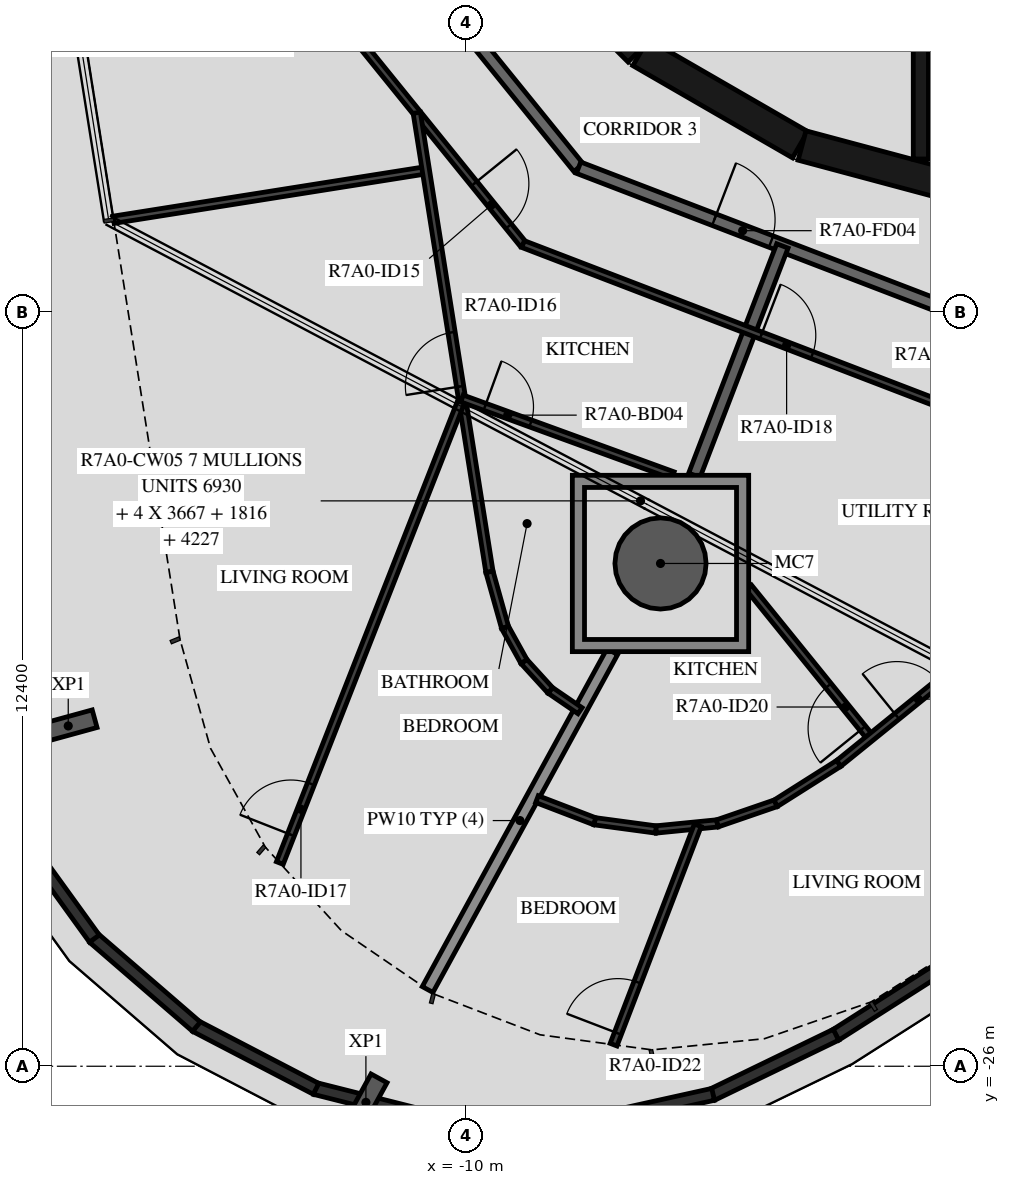
"""IFC4 building model, lengths in metres.
Left out: names, types, materials, properties, quantities, classifications, styles, units other than length and angle.
Written with IfcOpenShell. Run it as: python <this file> out.ifc"""

import sys

from ifc_helpers import new_model, si_unit, direction, frame, frame_2d, origin, origin_2d, place, context, subcontext, project, spatial, polyline, rectangle, hollow_circle, i_section, outline, extrude, element, fill, save


model = new_model("IFC4")
c1 = context("Model", 3, precision=1e-05, world=origin(), true_north=direction((0.0, 1.0)))
c2 = subcontext(c1, "Body", "Model", "MODEL_VIEW")
j1 = project(units=[si_unit("LENGTHUNIT", "METRE"), si_unit("PLANEANGLEUNIT", "RADIAN")], contexts=[c1])
p1 = place(None, origin())
s1 = spatial("IfcSite", under=j1, at=p1, CompositionType="ELEMENT")
p2 = place(p1, origin())
s2 = spatial("IfcBuilding", under=s1, at=p2, CompositionType="ELEMENT")
p3 = place(p2, frame((0.0, 0.0, 263.4)))
s3 = spatial("IfcBuildingStorey", under=s2, at=p3, CompositionType="ELEMENT", Elevation=263.4)
p4 = place(p3, frame((-6.807, -17.732, -0.45), z_axis=(0.0, 0.0, 1.0), x_axis=(1.0, 0.0, 0.0)))
e1 = element("IfcColumn", 1, at=p4, inside=s3, PredefinedType="COLUMN", context=c2, shape_type="SweptSolid", body=[
    extrude(hollow_circle(Radius=0.75, WallThickness=0.035, at=origin_2d()), origin(), (0.0, 0.0, 1.0), 3.57),
])
for number, where, z_axis, x_axis in (
    (2, (-16.547, -20.404, -0.45), (0.0, 0.0, 1.0), (-0.265, 0.964, 0.0)),
    (3, (-11.652, -26.594, -0.45), (0.0, 0.0, 1.0), (-0.877, 0.48, 0.0)),
):
    element("IfcColumn", number, at=place(p3, frame(where, z_axis=z_axis, x_axis=x_axis)), inside=s3, PredefinedType="COLUMN", context=c2, shape_type="SweptSolid", body=[
        extrude(i_section(OverallWidth=0.3, OverallDepth=0.9, WebThickness=0.019, FlangeThickness=0.035, FilletRadius=0.03, at=origin_2d()), origin(), (0.0, 0.0, 1.0), 3.57),
    ])
p5 = place(p3, frame((24.757, -7.212, 0.03), z_axis=(0.0, 0.0, 1.0), x_axis=(-0.843392095095, -0.537298589177, 0.0)))
e4 = element("IfcWall", 4, at=p5, inside=s3, PredefinedType="PARAPET", context=c2, shape_type="SweptSolid", body=[
    extrude(rectangle(XDim=34.009, YDim=0.2, at=frame_2d((17.004, 0.0))), origin(), (0.0, 0.0, 1.0), 1.5),
])
p6 = place(p3, frame((-3.921, -25.482, 0.03), z_axis=(0.0, 0.0, 1.0), x_axis=(-0.900085379351, -0.435713564028, 0.0)))
e5 = element("IfcWall", 5, at=p6, inside=s3, PredefinedType="PARAPET", context=c2, shape_type="SweptSolid", body=[
    extrude(rectangle(XDim=2.258, YDim=0.2, at=frame_2d((1.129, 0.0))), origin(), (0.0, 0.0, 1.0), 1.5),
])
p7 = place(p3, frame((-5.942, -26.462, 0.03), z_axis=(0.0, 0.0, 1.0), x_axis=(-0.976302939935, -0.21640833966, 0.0)))
e6 = element("IfcWall", 6, at=p7, inside=s3, PredefinedType="PARAPET", context=c2, shape_type="SweptSolid", body=[
    extrude(rectangle(XDim=2.228, YDim=0.2, at=frame_2d((1.114, 0.0))), origin(), (0.0, 0.0, 1.0), 1.5),
])
for number, where, z_axis, x_axis in (
    (7, (-10.323, -26.912, 0.03), (0.0, 0.0, 1.0), (-0.97, 0.245, 0.0)),
    (8, (-12.472, -26.371, 0.03), (0.0, 0.0, 1.0), (-0.887, 0.462, 0.0)),
    (9, (-14.439, -25.349, 0.03), (0.0, 0.0, 1.0), (-0.757, 0.654, 0.0)),
    (10, (-16.117, -23.9, 0.03), (0.0, 0.0, 1.0), (-0.586, 0.811, 0.0)),
):
    element("IfcWall", number, at=place(p3, frame(where, z_axis=z_axis, x_axis=x_axis)), inside=s3, PredefinedType="PARAPET", context=c2, shape_type="SweptSolid", body=[
        extrude(rectangle(XDim=2.228, YDim=0.2, at=frame_2d((1.114, 0.0))), origin(), (0.0, 0.0, 1.0), 1.5),
    ])
p8 = place(p3, frame((-9.308, -7.164, 0.0), z_axis=(0.0, 0.0, 1.0), x_axis=(0.707106781187, -0.707106781187, 0.0)))
e11 = element("IfcWall", 11, at=p8, inside=s3, PredefinedType="SHEAR", context=c2, shape_type="SweptSolid", body=[
    extrude(rectangle(XDim=3.032, YDim=0.5, at=frame_2d((1.516, 0.0))), origin(), (0.0, 0.0, 1.0), 3.12),
])
for number, where, z_axis, x_axis in (
    (12, (-7.137, -9.329, 0.0), (0.0, 0.0, 1.0), (0.866, -0.5, 0.0)),
    (13, (-4.479, -10.858, 0.0), (0.0, 0.0, 1.0), (0.966, -0.259, 0.0)),
):
    element("IfcWall", number, at=place(p3, frame(where, z_axis=z_axis, x_axis=x_axis)), inside=s3, PredefinedType="SHEAR", context=c2, shape_type="SweptSolid", body=[
        extrude(rectangle(XDim=3.033, YDim=0.5, at=frame_2d((1.516, 0.0))), origin(), (0.0, 0.0, 1.0), 3.12),
    ])
p9 = place(p3, frame((-2.525, -8.97, 0.0), z_axis=(0.0, 0.0, 1.0), x_axis=(0.0, -1.0, 0.0)))
e14 = element("IfcWall", 14, at=p9, inside=s3, PredefinedType="SHEAR", context=c2, shape_type="SweptSolid", body=[
    extrude(rectangle(XDim=2.11, YDim=0.25, at=frame_2d((1.055, 0.0))), origin(), (0.0, 0.0, 1.0), 3.12),
])
p10 = place(p3, frame((-12.673, -5.643, 0.0), z_axis=(0.0, 0.0, 1.0), x_axis=(0.629302871585, -0.777160148113, 0.0)))
e15 = element("IfcWall", 15, at=p10, inside=s3, PredefinedType="STANDARD", context=c2, shape_type="SweptSolid", body=[
    extrude(rectangle(XDim=7.181, YDim=0.2, at=frame_2d((3.59, 0.0))), origin(), (0.0, 0.0, 1.0), 3.12),
])
p11 = place(p3, frame((-8.154, -11.223, 0.0), z_axis=(0.0, 0.0, 1.0), x_axis=(0.93359073609, -0.358341090983, 0.0)))
e16 = element("IfcWall", 16, at=p11, inside=s3, PredefinedType="STANDARD", context=c2, shape_type="SweptSolid", body=[
    extrude(rectangle(XDim=7.181, YDim=0.2, at=frame_2d((3.59, 0.0))), origin(), (0.0, 0.0, 1.0), 3.12),
])
p12 = place(p11, frame((2.39, 0.0, 0.0)))
e17 = element("IfcOpeningElement", 17, at=p12, cuts=e16, PredefinedType="OPENING", context=c2, shape_type="SweptSolid", body=[
    extrude(rectangle(XDim=1.0, YDim=2.1, at=frame_2d((0.5, 1.05))), frame((0.0, 0.11, 0.0), z_axis=(0.0, -1.0, 0.0), x_axis=(1.0, 0.0, 0.0)), (0.0, 0.0, 1.0), 0.22),
])
p13 = place(p3, frame((-6.25, -16.282, 0.0), z_axis=(0.0, 0.0, 1.0), x_axis=(0.358351333512, 0.933586804625, 0.0)))
e18 = element("IfcWall", 18, at=p13, inside=s3, PredefinedType="STANDARD", context=c2, shape_type="SweptSolid", body=[
    extrude(rectangle(XDim=4.04, YDim=0.2, at=frame_2d((2.02, 0.0))), origin(), (0.0, 0.0, 1.0), 3.12),
])
p14 = place(p3, frame((-10.637, -24.738, 0.0), z_axis=(0.0, 0.0, 1.0), x_axis=(0.479683887596, 0.877441375808, 0.0)))
e19 = element("IfcWall", 19, at=p14, inside=s3, PredefinedType="STANDARD", context=c2, shape_type="SweptSolid", body=[
    extrude(rectangle(XDim=6.333, YDim=0.2, at=frame_2d((3.166, 0.0))), origin(), (0.0, 0.0, 1.0), 2.73),
])
p15 = place(p3, frame((-14.092, -6.274, 0.0), z_axis=(0.0, 0.0, 1.0), x_axis=(0.62933367237, -0.777135206268, 0.0)))
e20 = element("IfcWall", 20, at=p15, inside=s3, PredefinedType="PARTITIONING", context=c2, shape_type="SweptSolid", body=[
    extrude(rectangle(XDim=7.985, YDim=0.12, at=frame_2d((3.992, 0.0))), origin(), (0.0, 0.0, 1.0), 3.12),
])
p16 = place(p15, frame((6.707, 0.0, 0.0)))
e21 = element("IfcOpeningElement", 21, at=p16, cuts=e20, PredefinedType="OPENING", context=c2, shape_type="SweptSolid", body=[
    extrude(rectangle(XDim=0.9, YDim=2.1, at=frame_2d((0.45, 1.05))), frame((0.0, 0.07, 0.0), z_axis=(0.0, -1.0, 0.0), x_axis=(1.0, 0.0, 0.0)), (0.0, 0.0, 1.0), 0.14),
])
p17 = place(p3, frame((-9.067, -12.479, 0.0), z_axis=(0.0, 0.0, 1.0), x_axis=(0.933579449035, -0.358370495911, 0.0)))
e22 = element("IfcWall", 22, at=p17, inside=s3, PredefinedType="PARTITIONING", context=c2, shape_type="SweptSolid", body=[
    extrude(rectangle(XDim=7.985, YDim=0.12, at=frame_2d((3.992, 0.0))), origin(), (0.0, 0.0, 1.0), 3.12),
])
p18 = place(p17, frame((4.192, 0.0, 0.0)))
e23 = element("IfcOpeningElement", 23, at=p18, cuts=e22, PredefinedType="OPENING", context=c2, shape_type="SweptSolid", body=[
    extrude(rectangle(XDim=0.9, YDim=2.1, at=frame_2d((0.45, 1.05))), frame((0.0, 0.07, 0.0), z_axis=(0.0, -1.0, 0.0), x_axis=(1.0, 0.0, 0.0)), (0.0, 0.0, 1.0), 0.14),
])
p19 = place(p3, frame((-15.802, -12.08, 0.0), z_axis=(0.0, 0.0, 1.0), x_axis=(0.987687857978, 0.156437512135, 0.0)))
e24 = element("IfcWall", 24, at=p19, inside=s3, PredefinedType="PARTITIONING", context=c2, shape_type="SweptSolid", body=[
    extrude(rectangle(XDim=5.2, YDim=0.12, at=frame_2d((2.6, 0.0))), origin(), (0.0, 0.0, 1.0), 2.73),
])
p20 = place(p3, frame((-9.619, -17.871, 0.0), z_axis=(0.0, 0.0, 1.0), x_axis=(-0.156433255633, 0.987688532146, 0.0)))
e25 = element("IfcWall", 25, at=p20, inside=s3, PredefinedType="PARTITIONING", context=c2, shape_type="SweptSolid", body=[
    extrude(rectangle(XDim=7.644, YDim=0.12, at=frame_2d((3.822, 0.0))), origin(), (0.0, 0.0, 1.0), 3.12),
])
p21 = place(p20, frame((3.087, 0.0, 0.0)))
e26 = element("IfcOpeningElement", 26, at=p21, cuts=e25, PredefinedType="OPENING", context=c2, shape_type="SweptSolid", body=[
    extrude(rectangle(XDim=0.9, YDim=2.1, at=frame_2d((0.45, 1.05))), frame((0.0, 0.07, 0.0), z_axis=(0.0, -1.0, 0.0), x_axis=(1.0, 0.0, 0.0)), (0.0, 0.0, 1.0), 0.14),
])
p22 = place(p3, frame((-13.067, -22.658, 0.0), z_axis=(0.0, 0.0, 1.0), x_axis=(0.365785999331, 0.930698986082, 0.0)))
e27 = element("IfcWall", 27, at=p22, inside=s3, PredefinedType="PARTITIONING", context=c2, shape_type="SweptSolid", body=[
    extrude(rectangle(XDim=8.196, YDim=0.12, at=frame_2d((4.098, 0.0))), origin(), (0.0, 0.0, 1.0), 3.12),
])
p23 = place(p22, frame((0.5, 0.0, 0.0)))
e28 = element("IfcOpeningElement", 28, at=p23, cuts=e27, PredefinedType="OPENING", context=c2, shape_type="SweptSolid", body=[
    extrude(rectangle(XDim=0.9, YDim=2.1, at=frame_2d((0.45, 1.05))), frame((0.0, 0.07, 0.0), z_axis=(0.0, -1.0, 0.0), x_axis=(1.0, 0.0, 0.0)), (0.0, 0.0, 1.0), 0.14),
])
p24 = place(p3, frame((-10.071, -15.019, 0.0), z_axis=(0.0, 0.0, 1.0), x_axis=(0.939648507355, -0.34214131967, 0.0)))
e29 = element("IfcWall", 29, at=p24, inside=s3, PredefinedType="PARTITIONING", context=c2, shape_type="SweptSolid", body=[
    extrude(rectangle(XDim=3.691, YDim=0.12, at=frame_2d((1.846, 0.0))), origin(), (0.0, 0.0, 1.0), 3.12),
])
p25 = place(p24, frame((0.4, 0.0, 0.0)))
e30 = element("IfcOpeningElement", 30, at=p25, cuts=e29, PredefinedType="OPENING", context=c2, shape_type="SweptSolid", body=[
    extrude(rectangle(XDim=0.8, YDim=2.1, at=frame_2d((0.4, 1.05))), frame((0.0, 0.07, 0.0), z_axis=(0.0, -1.0, 0.0), x_axis=(1.0, 0.0, 0.0)), (0.0, 0.0, 1.0), 0.14),
])
p26 = place(p3, frame((-8.13, -20.153, 0.0), z_axis=(0.0, 0.0, 1.0), x_axis=(-0.825599905246, 0.564255967145, 0.0)))
e31 = element("IfcWall", 31, at=p26, inside=s3, PredefinedType="PARTITIONING", context=c2, shape_type="SweptSolid", body=[
    extrude(rectangle(XDim=0.593, YDim=0.12, at=frame_2d((0.297, 0.0))), origin(), (0.0, 0.0, 1.0), 3.12),
])
for number, where, z_axis, x_axis in (
    (32, (-8.62, -19.818, 0.0), (0.0, 0.0, 1.0), (-0.673, 0.739, 0.0)),
    (33, (-9.052, -19.344, 0.0), (0.0, 0.0, 1.0), (-0.485, 0.874, 0.0)),
):
    element("IfcWall", number, at=place(p3, frame(where, z_axis=z_axis, x_axis=x_axis)), inside=s3, PredefinedType="PARTITIONING", context=c2, shape_type="SweptSolid", body=[
        extrude(rectangle(XDim=0.642, YDim=0.12, at=frame_2d((0.321, 0.0))), origin(), (0.0, 0.0, 1.0), 3.12),
    ])
p27 = place(p3, frame((-9.364, -18.782, 0.0), z_axis=(0.0, 0.0, 1.0), x_axis=(-0.269811707714, 0.962913102196, 0.0)))
e34 = element("IfcWall", 34, at=p27, inside=s3, PredefinedType="PARTITIONING", context=c2, shape_type="SweptSolid", body=[
    extrude(rectangle(XDim=0.947, YDim=0.12, at=frame_2d((0.473, 0.0))), origin(), (0.0, 0.0, 1.0), 3.12),
])
p28 = place(p3, frame((-5.872, -22.006, 0.0), z_axis=(0.0, 0.0, 1.0), x_axis=(-0.99510832942, -0.09878973995, 0.0)))
e35 = element("IfcWall", 35, at=p28, inside=s3, PredefinedType="PARTITIONING", context=c2, shape_type="SweptSolid", body=[
    extrude(rectangle(XDim=1.016, YDim=0.12, at=frame_2d((0.508, 0.0))), origin(), (0.0, 0.0, 1.0), 3.12),
])
p29 = place(p3, frame((-6.883, -22.106, 0.0), z_axis=(0.0, 0.0, 1.0), x_axis=(-0.991069822827, 0.133343939799, 0.0)))
e36 = element("IfcWall", 36, at=p29, inside=s3, PredefinedType="PARTITIONING", context=c2, shape_type="SweptSolid", body=[
    extrude(rectangle(XDim=1.016, YDim=0.12, at=frame_2d((0.508, 0.0))), origin(), (0.0, 0.0, 1.0), 3.12),
])
p30 = place(p3, frame((-7.89, -21.971, 0.0), z_axis=(0.0, 0.0, 1.0), x_axis=(-0.933574629243, 0.358383051545, 0.0)))
e37 = element("IfcWall", 37, at=p30, inside=s3, PredefinedType="PARTITIONING", context=c2, shape_type="SweptSolid", body=[
    extrude(rectangle(XDim=1.016, YDim=0.12, at=frame_2d((0.508, 0.0))), origin(), (0.0, 0.0, 1.0), 3.12),
])
p31 = place(p3, frame((-7.579, -25.646, 0.0), z_axis=(0.0, 0.0, 1.0), x_axis=(0.358314257596, 0.933601035134, 0.0)))
e38 = element("IfcWall", 38, at=p31, inside=s3, PredefinedType="PARTITIONING", context=c2, shape_type="SweptSolid", body=[
    extrude(rectangle(XDim=3.864, YDim=0.12, at=frame_2d((1.932, 0.0))), origin(), (0.0, 0.0, 1.0), 3.12),
])
p32 = place(p31, frame((0.2, 0.0, 0.0)))
e39 = element("IfcOpeningElement", 39, at=p32, cuts=e38, PredefinedType="OPENING", context=c2, shape_type="SweptSolid", body=[
    extrude(rectangle(XDim=0.9, YDim=2.1, at=frame_2d((0.45, 1.05))), frame((0.0, 0.07, 0.0), z_axis=(0.0, -1.0, 0.0), x_axis=(1.0, 0.0, 0.0)), (0.0, 0.0, 1.0), 0.14),
])
p33 = place(p3, frame((-3.354, -20.597, 0.0), z_axis=(0.0, 0.0, 1.0), x_axis=(-0.629352711751, 0.777119787556, 0.0)))
e40 = element("IfcWall", 40, at=p33, inside=s3, PredefinedType="PARTITIONING", context=c2, shape_type="SweptSolid", body=[
    extrude(rectangle(XDim=3.182, YDim=0.12, at=frame_2d((1.591, 0.0))), origin(), (0.0, 0.0, 1.0), 3.12),
])
p34 = place(p33, frame((0.2, 0.0, 0.0)))
e41 = element("IfcOpeningElement", 41, at=p34, cuts=e40, PredefinedType="OPENING", context=c2, shape_type="SweptSolid", body=[
    extrude(rectangle(XDim=0.9, YDim=2.1, at=frame_2d((0.45, 1.05))), frame((0.0, 0.07, 0.0), z_axis=(0.0, -1.0, 0.0), x_axis=(1.0, 0.0, 0.0)), (0.0, 0.0, 1.0), 0.14),
])
p35 = place(p3, frame((-5.872, -22.006, 0.0), z_axis=(0.0, 0.0, 1.0), x_axis=(0.945561838326, 0.325442483247, 0.0)))
e42 = element("IfcWall", 42, at=p35, inside=s3, PredefinedType="PARTITIONING", context=c2, shape_type="SweptSolid", body=[
    extrude(rectangle(XDim=1.016, YDim=0.12, at=frame_2d((0.508, 0.0))), origin(), (0.0, 0.0, 1.0), 3.12),
])
p36 = place(p3, frame((-4.912, -21.676, 0.0), z_axis=(0.0, 0.0, 1.0), x_axis=(0.84494492492, 0.534853319941, 0.0)))
e43 = element("IfcWall", 43, at=p36, inside=s3, PredefinedType="PARTITIONING", context=c2, shape_type="SweptSolid", body=[
    extrude(rectangle(XDim=1.228, YDim=0.12, at=frame_2d((0.614, 0.0))), origin(), (0.0, 0.0, 1.0), 3.12),
])
p37 = place(p3, frame((-3.875, -21.019, 0.0), z_axis=(0.0, 0.0, 1.0), x_axis=(0.777149096542, 0.629316519523, 0.0)))
e44 = element("IfcWall", 44, at=p37, inside=s3, PredefinedType="PARTITIONING", context=c2, shape_type="SweptSolid", body=[
    extrude(rectangle(XDim=10.508, YDim=0.12, at=frame_2d((5.254, 0.0))), origin(), (0.0, 0.0, 1.0), 3.12),
])
p38 = place(p37, frame((1.23, 0.0, 0.0)))
e45 = element("IfcOpeningElement", 45, at=p38, cuts=e44, PredefinedType="OPENING", context=c2, shape_type="SweptSolid", body=[
    extrude(rectangle(XDim=0.9, YDim=2.1, at=frame_2d((0.45, 1.05))), frame((0.0, 0.07, 0.0), z_axis=(0.0, -1.0, 0.0), x_axis=(1.0, 0.0, 0.0)), (0.0, 0.0, 1.0), 0.14),
])
p39 = place(p3, origin())
e46 = element("IfcWall", 46, at=p39, inside=s3, PredefinedType="STANDARD", context=c2, shape_type="SweptSolid", body=[
    extrude(outline(polyline([(-5.357, -16.282), (-5.357, -19.182), (-8.257, -19.182), (-8.257, -16.282), (-5.357, -16.282)]), holes=[polyline([(-8.057, -18.982), (-5.557, -18.982), (-5.557, -16.482), (-8.057, -16.482), (-8.057, -18.982)])]), origin(), (0.0, 0.0, 1.0), 3.12),
])
p40 = place(p12, origin())
e47 = element("IfcDoor", 47, at=p40, inside=s3, OperationType="SINGLE_SWING_RIGHT", PredefinedType="DOOR", context=c2, shape_type="SweptSolid", body=[
    extrude(rectangle(XDim=1.0, YDim=2.1, at=frame_2d((0.5, 1.05))), frame((0.0, 0.025, 0.0), z_axis=(0.0, -1.0, 0.0), x_axis=(1.0, 0.0, 0.0)), (0.0, 0.0, 1.0), 0.05),
])
fill(e17, e47)
p41 = place(p16, origin())
e48 = element("IfcDoor", 48, at=p41, inside=s3, OperationType="SINGLE_SWING_RIGHT", PredefinedType="DOOR", context=c2, shape_type="SweptSolid", body=[
    extrude(rectangle(XDim=0.9, YDim=2.1, at=frame_2d((0.45, 1.05))), frame((0.0, 0.025, 0.0), z_axis=(0.0, -1.0, 0.0), x_axis=(1.0, 0.0, 0.0)), (0.0, 0.0, 1.0), 0.05),
])
fill(e21, e48)
p42 = place(p21, origin())
e49 = element("IfcDoor", 49, at=p42, inside=s3, OperationType="SINGLE_SWING_RIGHT", PredefinedType="DOOR", context=c2, shape_type="SweptSolid", body=[
    extrude(rectangle(XDim=0.9, YDim=2.1, at=frame_2d((0.45, 1.05))), frame((0.0, 0.025, 0.0), z_axis=(0.0, -1.0, 0.0), x_axis=(1.0, 0.0, 0.0)), (0.0, 0.0, 1.0), 0.05),
])
fill(e26, e49)
p43 = place(p23, origin())
e50 = element("IfcDoor", 50, at=p43, inside=s3, OperationType="SINGLE_SWING_RIGHT", PredefinedType="DOOR", context=c2, shape_type="SweptSolid", body=[
    extrude(rectangle(XDim=0.9, YDim=2.1, at=frame_2d((0.45, 1.05))), frame((0.0, 0.025, 0.0), z_axis=(0.0, -1.0, 0.0), x_axis=(1.0, 0.0, 0.0)), (0.0, 0.0, 1.0), 0.05),
])
fill(e28, e50)
p44 = place(p25, origin())
e51 = element("IfcDoor", 51, at=p44, inside=s3, OperationType="SINGLE_SWING_RIGHT", PredefinedType="DOOR", context=c2, shape_type="SweptSolid", body=[
    extrude(rectangle(XDim=0.8, YDim=2.1, at=frame_2d((0.4, 1.05))), frame((0.0, 0.025, 0.0), z_axis=(0.0, -1.0, 0.0), x_axis=(1.0, 0.0, 0.0)), (0.0, 0.0, 1.0), 0.05),
])
fill(e30, e51)
p45 = place(p18, origin())
e52 = element("IfcDoor", 52, at=p45, inside=s3, OperationType="SINGLE_SWING_RIGHT", PredefinedType="DOOR", context=c2, shape_type="SweptSolid", body=[
    extrude(rectangle(XDim=0.9, YDim=2.1, at=frame_2d((0.45, 1.05))), frame((0.0, 0.025, 0.0), z_axis=(0.0, -1.0, 0.0), x_axis=(1.0, 0.0, 0.0)), (0.0, 0.0, 1.0), 0.05),
])
fill(e23, e52)
p46 = place(p34, origin())
e53 = element("IfcDoor", 53, at=p46, inside=s3, OperationType="SINGLE_SWING_LEFT", PredefinedType="DOOR", context=c2, shape_type="SweptSolid", body=[
    extrude(rectangle(XDim=0.9, YDim=2.1, at=frame_2d((0.45, 1.05))), frame((0.0, 0.025, 0.0), z_axis=(0.0, -1.0, 0.0), x_axis=(1.0, 0.0, 0.0)), (0.0, 0.0, 1.0), 0.05),
])
fill(e41, e53)
p47 = place(p38, origin())
e54 = element("IfcDoor", 54, at=p47, inside=s3, OperationType="SINGLE_SWING_LEFT", PredefinedType="DOOR", context=c2, shape_type="SweptSolid", body=[
    extrude(rectangle(XDim=0.9, YDim=2.1, at=frame_2d((0.45, 1.05))), frame((0.0, 0.025, 0.0), z_axis=(0.0, -1.0, 0.0), x_axis=(1.0, 0.0, 0.0)), (0.0, 0.0, 1.0), 0.05),
])
fill(e45, e54)
p48 = place(p32, origin())
e55 = element("IfcDoor", 55, at=p48, inside=s3, OperationType="SINGLE_SWING_LEFT", PredefinedType="DOOR", context=c2, shape_type="SweptSolid", body=[
    extrude(rectangle(XDim=0.9, YDim=2.1, at=frame_2d((0.45, 1.05))), frame((0.0, 0.025, 0.0), z_axis=(0.0, -1.0, 0.0), x_axis=(1.0, 0.0, 0.0)), (0.0, 0.0, 1.0), 0.05),
])
fill(e39, e55)
save(model, sys.argv[1])
